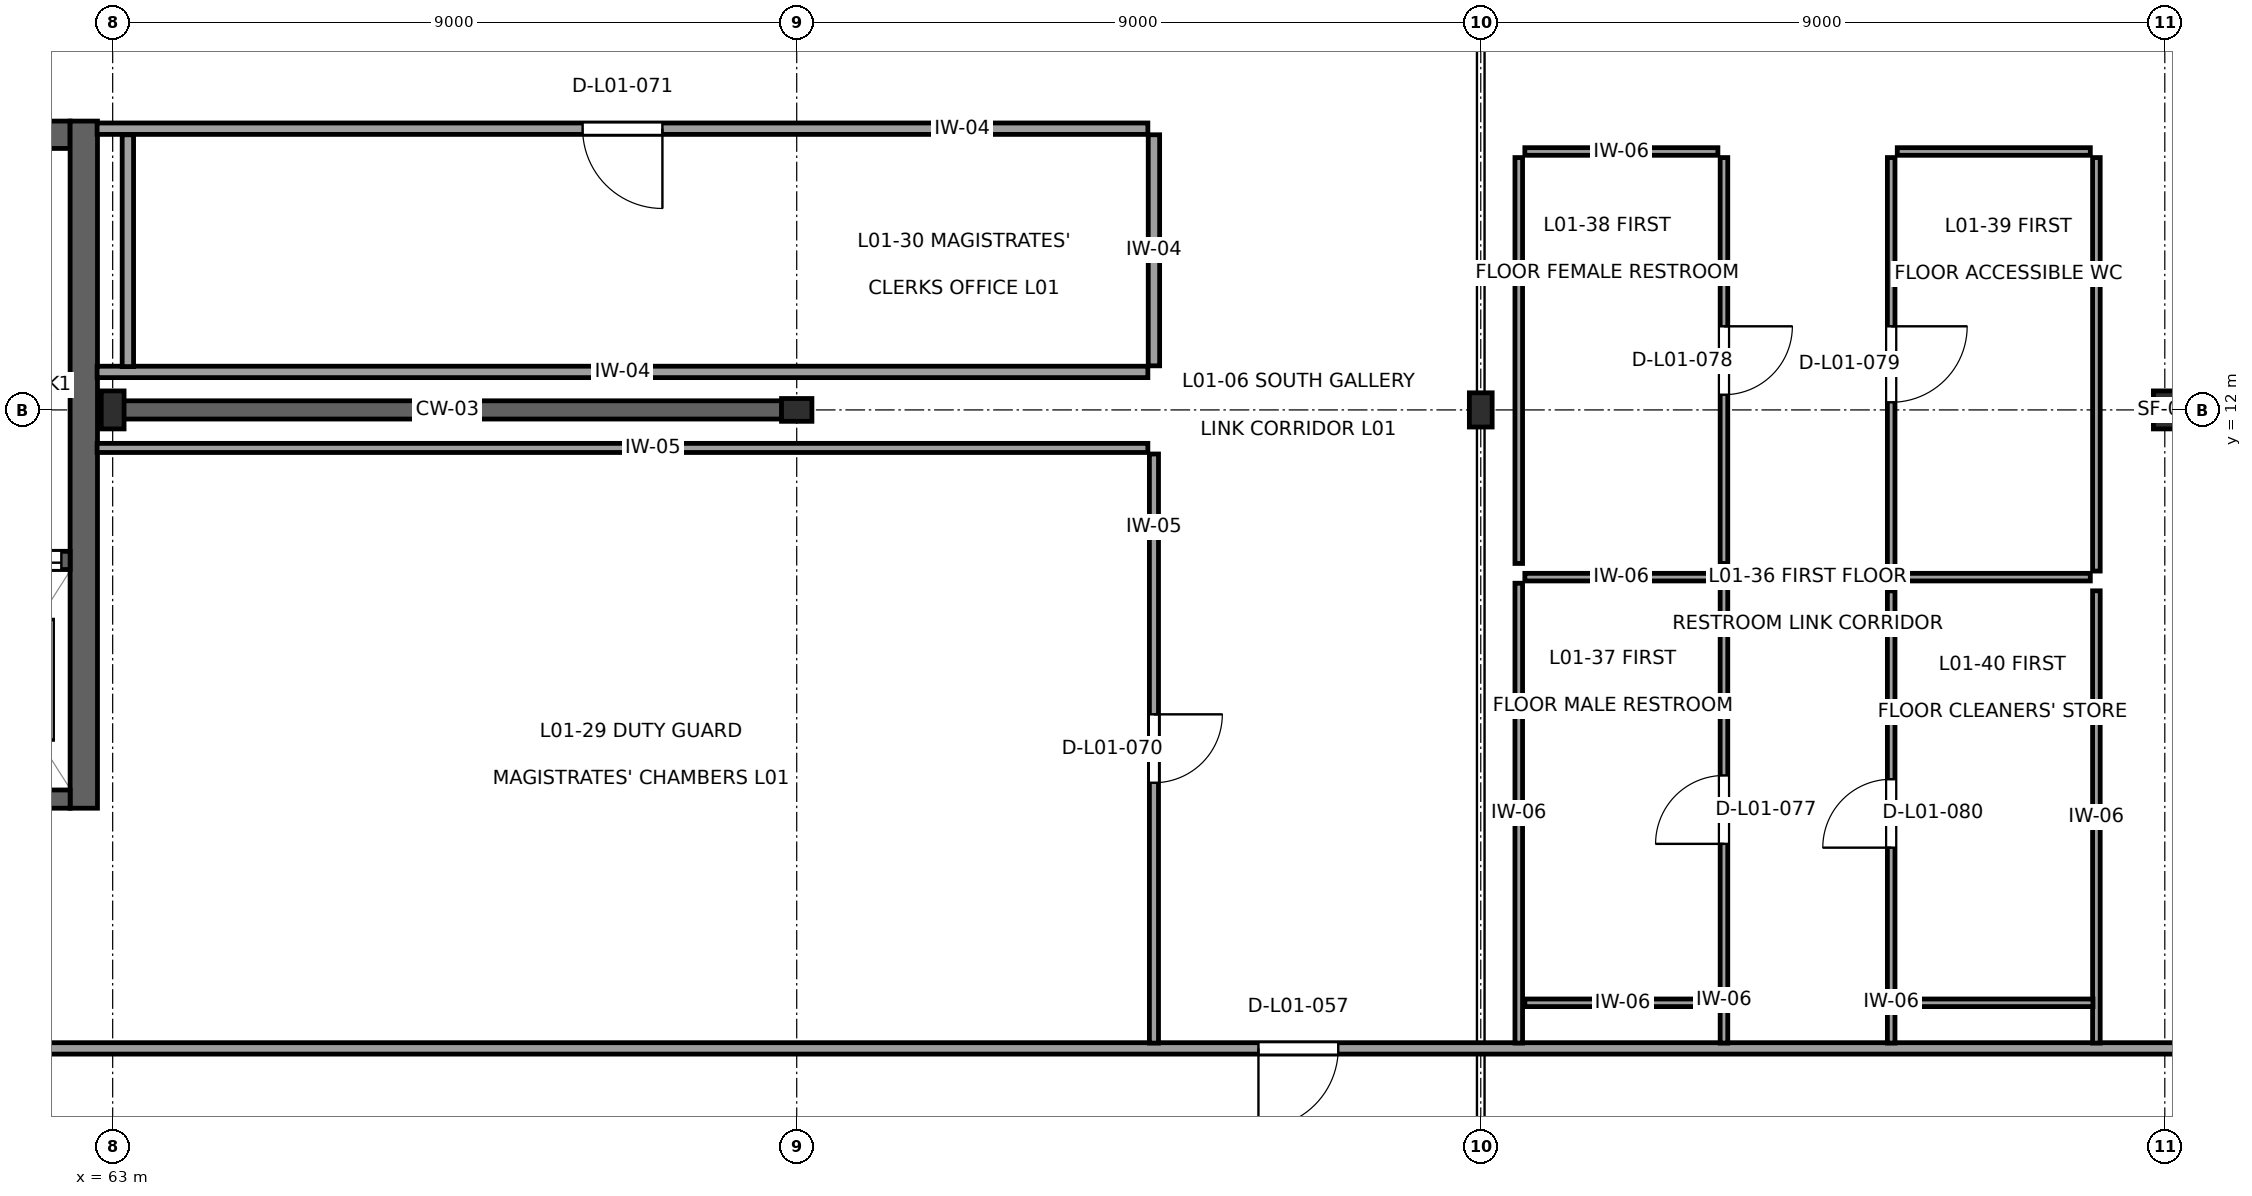
"""IFC4 building model, lengths in metres.
Left out: names, types, materials, properties, quantities, classifications, styles, units other than length and angle.
Written with IfcOpenShell. Run it as: python <this file> out.ifc"""

import sys

from ifc_helpers import new_model, si_unit, direction, frame, frame_2d, origin, origin_2d, place, context, subcontext, project, spatial, rectangle, i_section, extrude, element, fill, save


model = new_model("IFC4")
c1 = context("Model", 3, precision=1e-05, world=origin(), true_north=direction((0.0, 1.0)))
c2 = subcontext(c1, "Body", "Model", "MODEL_VIEW")
j1 = project(units=[si_unit("LENGTHUNIT", "METRE"), si_unit("PLANEANGLEUNIT", "RADIAN")], contexts=[c1])
p1 = place(None, origin())
s1 = spatial("IfcSite", under=j1, at=p1, CompositionType="ELEMENT")
p2 = place(p1, origin())
s2 = spatial("IfcBuilding", under=s1, at=p2, CompositionType="ELEMENT")
p3 = place(p2, frame((0.0, 0.0, 5.4)))
s3 = spatial("IfcBuildingStorey", under=s2, at=p3, CompositionType="ELEMENT", Elevation=5.4)
p4 = place(p3, frame((63.0, 12.0, 0.0), z_axis=(0.0, 0.0, 1.0), x_axis=(1.0, 0.0, 0.0)))
e1 = element("IfcColumn", 1, at=p4, inside=s3, PredefinedType="COLUMN", context=c2, shape_type="SweptSolid", body=[
    extrude(i_section(OverallWidth=0.3, OverallDepth=0.5, WebThickness=0.014, FlangeThickness=0.028, at=origin_2d()), origin(), (0.0, 0.0, 1.0), 4.5),
])
p5 = place(p3, frame((72.0, 12.0, 0.0), z_axis=(0.0, 0.0, 1.0), x_axis=(0.0, 1.0, 0.0)))
e2 = element("IfcColumn", 2, at=p5, inside=s3, PredefinedType="COLUMN", context=c2, shape_type="SweptSolid", body=[
    extrude(i_section(OverallWidth=0.3, OverallDepth=0.4, WebThickness=0.013, FlangeThickness=0.024, at=origin_2d()), origin(), (0.0, 0.0, 1.0), 4.5),
])
p6 = place(p3, frame((81.0, 12.0, 0.0), z_axis=(0.0, 0.0, 1.0), x_axis=(1.0, 0.0, 0.0)))
e3 = element("IfcColumn", 3, at=p6, inside=s3, PredefinedType="COLUMN", context=c2, shape_type="SweptSolid", body=[
    extrude(i_section(OverallWidth=0.3, OverallDepth=0.45, WebThickness=0.014, FlangeThickness=0.026, at=origin_2d()), origin(), (0.0, 0.0, 1.0), 4.5),
])
p7 = place(p3, frame((90.0, 12.0, 0.0), z_axis=(0.0, 0.0, 1.0), x_axis=(1.0, 0.0, 0.0)))
e4 = element("IfcColumn", 4, at=p7, inside=s3, PredefinedType="COLUMN", context=c2, shape_type="SweptSolid", body=[
    extrude(i_section(OverallWidth=0.3, OverallDepth=0.5, WebThickness=0.014, FlangeThickness=0.028, at=origin_2d()), origin(), (0.0, 0.0, 1.0), 4.5),
])
p8 = place(p3, frame((58.54, 15.62, 0.0), z_axis=(0.0, 0.0, 1.0), x_axis=(1.0, 0.0, 0.0)))
e5 = element("IfcWall", 5, at=p8, inside=s3, PredefinedType="SHEAR", context=c2, shape_type="SweptSolid", body=[
    extrude(rectangle(XDim=3.9, YDim=0.36, at=frame_2d((1.95, 0.0))), origin(), (0.0, 0.0, 1.0), 4.16),
])
p9 = place(p8, frame((1.15, 0.0, 0.0)))
e6 = element("IfcOpeningElement", 6, at=p9, cuts=e5, PredefinedType="OPENING", context=c2, shape_type="SweptSolid", body=[
    extrude(rectangle(XDim=1.6, YDim=2.25, at=frame_2d((0.8, 1.125))), frame((0.0, 0.195, 0.0), z_axis=(0.0, -1.0, 0.0), x_axis=(1.0, 0.0, 0.0)), (0.0, 0.0, 1.0), 0.39),
])
p10 = place(p3, frame((62.62, 6.76, 0.0), z_axis=(0.0, 0.0, 1.0), x_axis=(0.0, 1.0, 0.0)))
e7 = element("IfcWall", 7, at=p10, inside=s3, PredefinedType="SHEAR", context=c2, shape_type="SweptSolid", body=[
    extrude(rectangle(XDim=9.04, YDim=0.36, at=frame_2d((4.52, 0.0))), origin(), (0.0, 0.0, 1.0), 4.16),
])
p11 = place(p3, frame((58.54, 10.02, 0.0), z_axis=(0.0, 0.0, 1.0), x_axis=(1.0, 0.0, 0.0)))
e8 = element("IfcWall", 8, at=p11, inside=s3, PredefinedType="SHEAR", context=c2, shape_type="SweptSolid", body=[
    extrude(rectangle(XDim=3.9, YDim=0.24, at=frame_2d((1.95, 0.0))), origin(), (0.0, 0.0, 1.0), 4.31),
])
p12 = place(p11, frame((0.235, 0.0, 0.0)))
e9 = element("IfcOpeningElement", 9, at=p12, cuts=e8, PredefinedType="OPENING", context=c2, shape_type="SweptSolid", body=[
    extrude(rectangle(XDim=1.6, YDim=2.3, at=frame_2d((0.8, 1.15))), frame((0.0, 0.135, 0.0), z_axis=(0.0, -1.0, 0.0), x_axis=(1.0, 0.0, 0.0)), (0.0, 0.0, 1.0), 0.27),
])
p13 = place(p11, frame((2.185, 0.0, 0.0)))
e10 = element("IfcOpeningElement", 10, at=p13, cuts=e8, PredefinedType="OPENING", context=c2, shape_type="SweptSolid", body=[
    extrude(rectangle(XDim=1.6, YDim=2.3, at=frame_2d((0.8, 1.15))), frame((0.0, 0.135, 0.0), z_axis=(0.0, -1.0, 0.0), x_axis=(1.0, 0.0, 0.0)), (0.0, 0.0, 1.0), 0.27),
])
p14 = place(p3, frame((58.54, 6.88, 0.0), z_axis=(0.0, 0.0, 1.0), x_axis=(1.0, 0.0, 0.0)))
e11 = element("IfcWall", 11, at=p14, inside=s3, PredefinedType="SHEAR", context=c2, shape_type="SweptSolid", body=[
    extrude(rectangle(XDim=3.9, YDim=0.24, at=frame_2d((1.95, 0.0))), origin(), (0.0, 0.0, 1.0), 4.31),
])
p15 = place(p3, frame((63.008, 12.0, 0.0), z_axis=(0.0, 0.0, 1.0), x_axis=(1.0, 0.0, 0.0)))
e12 = element("IfcWall", 12, at=p15, inside=s3, PredefinedType="SHEAR", context=c2, shape_type="SweptSolid", body=[
    extrude(rectangle(XDim=8.794, YDim=0.24, at=frame_2d((4.397, 0.0))), origin(), (0.0, 0.0, 1.0), 3.585),
])
p16 = place(p3, frame((46.08, 3.6, 0.0), z_axis=(0.0, 0.0, 1.0), x_axis=(1.0, 0.0, 0.0)))
e13 = element("IfcWall", 13, at=p16, inside=s3, PredefinedType="PARTITIONING", context=c2, shape_type="SweptSolid", body=[
    extrude(rectangle(XDim=71.04, YDim=0.15, at=frame_2d((35.52, 0.0))), origin(), (0.0, 0.0, 1.0), 4.14),
])
p17 = place(p16, frame((31.995, 0.0, 0.0)))
e14 = element("IfcOpeningElement", 14, at=p17, cuts=e13, PredefinedType="OPENING", context=c2, shape_type="SweptSolid", body=[
    extrude(rectangle(XDim=1.05, YDim=2.25, at=frame_2d((0.525, 1.125))), frame((0.0, 0.09, 0.0), z_axis=(0.0, -1.0, 0.0), x_axis=(1.0, 0.0, 0.0)), (0.0, 0.0, 1.0), 0.18),
])
p18 = place(p16, frame((68.39, 0.0, 1.05)))
e15 = element("IfcOpeningElement", 15, at=p18, cuts=e13, PredefinedType="OPENING", context=c2, shape_type="SweptSolid", body=[
    extrude(rectangle(XDim=1.8, YDim=1.1, at=frame_2d((0.9, 0.55))), frame((0.0, 0.09, 0.0), z_axis=(0.0, -1.0, 0.0), x_axis=(1.0, 0.0, 0.0)), (0.0, 0.0, 1.0), 0.18),
])
p19 = place(p3, frame((76.7, 11.42, 0.0), z_axis=(0.0, 0.0, 1.0), x_axis=(0.0, -1.0, 0.0)))
e16 = element("IfcWall", 16, at=p19, inside=s3, PredefinedType="PARTITIONING", context=c2, shape_type="SweptSolid", body=[
    extrude(rectangle(XDim=7.75, YDim=0.12, at=frame_2d((3.875, 0.0))), origin(), (0.0, 0.0, 1.0), 4.14),
])
p20 = place(p19, frame((3.425, 0.0, 0.0)))
e17 = element("IfcOpeningElement", 17, at=p20, cuts=e16, PredefinedType="OPENING", context=c2, shape_type="SweptSolid", body=[
    extrude(rectangle(XDim=0.9, YDim=2.1, at=frame_2d((0.45, 1.05))), frame((0.0, 0.075, 0.0), z_axis=(0.0, -1.0, 0.0), x_axis=(1.0, 0.0, 0.0)), (0.0, 0.0, 1.0), 0.15),
])
p21 = place(p3, frame((62.795, 11.5, 0.0), z_axis=(0.0, 0.0, 1.0), x_axis=(1.0, 0.0, 0.0)))
e18 = element("IfcWall", 18, at=p21, inside=s3, PredefinedType="PARTITIONING", context=c2, shape_type="SweptSolid", body=[
    extrude(rectangle(XDim=13.825, YDim=0.12, at=frame_2d((6.913, 0.0))), origin(), (0.0, 0.0, 1.0), 4.14),
])
p22 = place(p3, frame((76.7, 15.62, 0.0), z_axis=(0.0, 0.0, 1.0), x_axis=(0.0, -1.0, 0.0)))
e19 = element("IfcWall", 19, at=p22, inside=s3, PredefinedType="PARTITIONING", context=c2, shape_type="SweptSolid", body=[
    extrude(rectangle(XDim=3.04, YDim=0.15, at=frame_2d((1.52, 0.0))), origin(), (0.0, 0.0, 1.0), 4.14),
])
p23 = place(p3, frame((76.62, 12.5, 0.0), z_axis=(0.0, 0.0, 1.0), x_axis=(-1.0, 0.0, 0.0)))
e20 = element("IfcWall", 20, at=p23, inside=s3, PredefinedType="PARTITIONING", context=c2, shape_type="SweptSolid", body=[
    extrude(rectangle(XDim=13.825, YDim=0.15, at=frame_2d((6.913, 0.0))), origin(), (0.0, 0.0, 1.0), 4.14),
])
p24 = place(p3, frame((63.2, 12.57, 0.0), z_axis=(0.0, 0.0, 1.0), x_axis=(0.0, 1.0, 0.0)))
e21 = element("IfcWall", 21, at=p24, inside=s3, PredefinedType="PARTITIONING", context=c2, shape_type="SweptSolid", body=[
    extrude(rectangle(XDim=3.05, YDim=0.15, at=frame_2d((1.525, 0.0))), origin(), (0.0, 0.0, 1.0), 3.685),
])
p25 = place(p3, frame((62.795, 15.7, 0.0), z_axis=(0.0, 0.0, 1.0), x_axis=(1.0, 0.0, 0.0)))
e22 = element("IfcWall", 22, at=p25, inside=s3, PredefinedType="PARTITIONING", context=c2, shape_type="SweptSolid", body=[
    extrude(rectangle(XDim=13.825, YDim=0.15, at=frame_2d((6.913, 0.0))), origin(), (0.0, 0.0, 1.0), 4.14),
])
p26 = place(p25, frame((6.388, 0.0, 0.0)))
e23 = element("IfcOpeningElement", 23, at=p26, cuts=e22, PredefinedType="OPENING", context=c2, shape_type="SweptSolid", body=[
    extrude(rectangle(XDim=1.05, YDim=2.25, at=frame_2d((0.525, 1.125))), frame((0.0, 0.09, 0.0), z_axis=(0.0, -1.0, 0.0), x_axis=(1.0, 0.0, 0.0)), (0.0, 0.0, 1.0), 0.18),
])
p27 = place(p3, frame((84.2, 9.72, 0.0), z_axis=(0.0, 0.0, 1.0), x_axis=(0.0, -1.0, 0.0)))
e24 = element("IfcWall", 24, at=p27, inside=s3, PredefinedType="PARTITIONING", context=c2, shape_type="SweptSolid", body=[
    extrude(rectangle(XDim=6.05, YDim=0.1, at=frame_2d((3.025, 0.0))), origin(), (0.0, 0.0, 1.0), 4.14),
])
p28 = place(p27, frame((2.529, 0.0, 0.0)))
e25 = element("IfcOpeningElement", 25, at=p28, cuts=e24, PredefinedType="OPENING", context=c2, shape_type="SweptSolid", body=[
    extrude(rectangle(XDim=0.9, YDim=2.05, at=frame_2d((0.45, 1.025))), frame((0.0, 0.065, 0.0), z_axis=(0.0, -1.0, 0.0), x_axis=(1.0, 0.0, 0.0)), (0.0, 0.0, 1.0), 0.13),
])
p29 = place(p3, frame((84.155, 4.2, 0.0), z_axis=(0.0, 0.0, 1.0), x_axis=(-1.0, 0.0, 0.0)))
e26 = element("IfcWall", 26, at=p29, inside=s3, PredefinedType="PARTITIONING", context=c2, shape_type="SweptSolid", body=[
    extrude(rectangle(XDim=2.575, YDim=0.1, at=frame_2d((1.288, 0.0))), origin(), (0.0, 0.0, 1.0), 4.14),
])
p30 = place(p3, frame((81.5, 3.67, 0.0), z_axis=(0.0, 0.0, 1.0), x_axis=(0.0, 1.0, 0.0)))
e27 = element("IfcWall", 27, at=p30, inside=s3, PredefinedType="PARTITIONING", context=c2, shape_type="SweptSolid", body=[
    extrude(rectangle(XDim=6.05, YDim=0.1, at=frame_2d((3.025, 0.0))), origin(), (0.0, 0.0, 1.0), 3.695),
])
p31 = place(p3, frame((81.58, 9.8, 0.0), z_axis=(0.0, 0.0, 1.0), x_axis=(1.0, 0.0, 0.0)))
e28 = element("IfcWall", 28, at=p31, inside=s3, PredefinedType="PARTITIONING", context=c2, shape_type="SweptSolid", body=[
    extrude(rectangle(XDim=2.54, YDim=0.1, at=frame_2d((1.27, 0.0))), origin(), (0.0, 0.0, 1.0), 4.14),
])
p32 = place(p3, frame((81.5, 9.98, 0.0), z_axis=(0.0, 0.0, 1.0), x_axis=(0.0, 1.0, 0.0)))
e29 = element("IfcWall", 29, at=p32, inside=s3, PredefinedType="PARTITIONING", context=c2, shape_type="SweptSolid", body=[
    extrude(rectangle(XDim=5.34, YDim=0.1, at=frame_2d((2.67, 0.0))), origin(), (0.0, 0.0, 1.0), 3.695),
])
p33 = place(p3, frame((81.58, 15.4, 0.0), z_axis=(0.0, 0.0, 1.0), x_axis=(1.0, 0.0, 0.0)))
e30 = element("IfcWall", 30, at=p33, inside=s3, PredefinedType="PARTITIONING", context=c2, shape_type="SweptSolid", body=[
    extrude(rectangle(XDim=2.54, YDim=0.1, at=frame_2d((1.27, 0.0))), origin(), (0.0, 0.0, 1.0), 4.14),
])
p34 = place(p3, frame((84.2, 15.32, 0.0), z_axis=(0.0, 0.0, 1.0), x_axis=(0.0, -1.0, 0.0)))
e31 = element("IfcWall", 31, at=p34, inside=s3, PredefinedType="PARTITIONING", context=c2, shape_type="SweptSolid", body=[
    extrude(rectangle(XDim=5.34, YDim=0.1, at=frame_2d((2.67, 0.0))), origin(), (0.0, 0.0, 1.0), 4.14),
])
p35 = place(p34, frame((2.22, 0.0, 0.0)))
e32 = element("IfcOpeningElement", 32, at=p35, cuts=e31, PredefinedType="OPENING", context=c2, shape_type="SweptSolid", body=[
    extrude(rectangle(XDim=0.9, YDim=2.05, at=frame_2d((0.45, 1.025))), frame((0.0, 0.065, 0.0), z_axis=(0.0, -1.0, 0.0), x_axis=(1.0, 0.0, 0.0)), (0.0, 0.0, 1.0), 0.13),
])
p36 = place(p3, frame((86.4, 9.88, 0.0), z_axis=(0.0, 0.0, 1.0), x_axis=(0.0, 1.0, 0.0)))
e33 = element("IfcWall", 33, at=p36, inside=s3, PredefinedType="PARTITIONING", context=c2, shape_type="SweptSolid", body=[
    extrude(rectangle(XDim=5.44, YDim=0.1, at=frame_2d((2.72, 0.0))), origin(), (0.0, 0.0, 1.0), 4.14),
])
p37 = place(p36, frame((2.22, 0.0, 0.0)))
e34 = element("IfcOpeningElement", 34, at=p37, cuts=e33, PredefinedType="OPENING", context=c2, shape_type="SweptSolid", body=[
    extrude(rectangle(XDim=1.0, YDim=2.1, at=frame_2d((0.5, 1.05))), frame((0.0, 0.065, 0.0), z_axis=(0.0, -1.0, 0.0), x_axis=(1.0, 0.0, 0.0)), (0.0, 0.0, 1.0), 0.13),
])
p38 = place(p3, frame((86.48, 15.4, 0.0), z_axis=(0.0, 0.0, 1.0), x_axis=(1.0, 0.0, 0.0)))
e35 = element("IfcWall", 35, at=p38, inside=s3, PredefinedType="PARTITIONING", context=c2, shape_type="SweptSolid", body=[
    extrude(rectangle(XDim=2.54, YDim=0.1, at=frame_2d((1.27, 0.0))), origin(), (0.0, 0.0, 1.0), 4.14),
])
p39 = place(p3, frame((89.1, 15.32, 0.0), z_axis=(0.0, 0.0, 1.0), x_axis=(0.0, -1.0, 0.0)))
e36 = element("IfcWall", 36, at=p39, inside=s3, PredefinedType="PARTITIONING", context=c2, shape_type="SweptSolid", body=[
    extrude(rectangle(XDim=5.44, YDim=0.1, at=frame_2d((2.72, 0.0))), origin(), (0.0, 0.0, 1.0), 4.14),
])
p40 = place(p3, frame((89.02, 9.8, 0.0), z_axis=(0.0, 0.0, 1.0), x_axis=(-1.0, 0.0, 0.0)))
e37 = element("IfcWall", 37, at=p40, inside=s3, PredefinedType="PARTITIONING", context=c2, shape_type="SweptSolid", body=[
    extrude(rectangle(XDim=2.54, YDim=0.1, at=frame_2d((1.27, 0.0))), origin(), (0.0, 0.0, 1.0), 4.14),
])
p41 = place(p3, frame((89.1, 9.62, 0.0), z_axis=(0.0, 0.0, 1.0), x_axis=(0.0, -1.0, 0.0)))
e38 = element("IfcWall", 38, at=p41, inside=s3, PredefinedType="PARTITIONING", context=c2, shape_type="SweptSolid", body=[
    extrude(rectangle(XDim=5.95, YDim=0.1, at=frame_2d((2.975, 0.0))), origin(), (0.0, 0.0, 1.0), 4.14),
])
p42 = place(p3, frame((89.055, 4.2, 0.0), z_axis=(0.0, 0.0, 1.0), x_axis=(-1.0, 0.0, 0.0)))
e39 = element("IfcWall", 39, at=p42, inside=s3, PredefinedType="PARTITIONING", context=c2, shape_type="SweptSolid", body=[
    extrude(rectangle(XDim=2.575, YDim=0.1, at=frame_2d((1.288, 0.0))), origin(), (0.0, 0.0, 1.0), 4.14),
])
p43 = place(p3, frame((86.4, 3.67, 0.0), z_axis=(0.0, 0.0, 1.0), x_axis=(0.0, 1.0, 0.0)))
e40 = element("IfcWall", 40, at=p43, inside=s3, PredefinedType="PARTITIONING", context=c2, shape_type="SweptSolid", body=[
    extrude(rectangle(XDim=5.95, YDim=0.1, at=frame_2d((2.975, 0.0))), origin(), (0.0, 0.0, 1.0), 4.14),
])
p44 = place(p43, frame((2.571, 0.0, 0.0)))
e41 = element("IfcOpeningElement", 41, at=p44, cuts=e40, PredefinedType="OPENING", context=c2, shape_type="SweptSolid", body=[
    extrude(rectangle(XDim=0.9, YDim=2.05, at=frame_2d((0.45, 1.025))), frame((0.0, 0.065, 0.0), z_axis=(0.0, -1.0, 0.0), x_axis=(1.0, 0.0, 0.0)), (0.0, 0.0, 1.0), 0.13),
])
p45 = place(p13, origin())
e42 = element("IfcDoor", 42, at=p45, inside=s3, OperationType="DOUBLE_DOOR_SLIDING", PredefinedType="DOOR", context=c2, shape_type="SweptSolid", body=[
    extrude(rectangle(XDim=1.6, YDim=2.3, at=frame_2d((0.8, 1.15))), frame((0.0, 0.025, 0.0), z_axis=(0.0, -1.0, 0.0), x_axis=(1.0, 0.0, 0.0)), (0.0, 0.0, 1.0), 0.05),
])
fill(e10, e42)
p46 = place(p17, frame((1.05, 0.0, 0.0), z_axis=(0.0, 0.0, 1.0), x_axis=(-1.0, 0.0, 0.0)))
e43 = element("IfcDoor", 43, at=p46, inside=s3, OperationType="SINGLE_SWING_LEFT", PredefinedType="DOOR", context=c2, shape_type="SweptSolid", body=[
    extrude(rectangle(XDim=1.05, YDim=2.25, at=frame_2d((0.525, 1.125))), frame((0.0, 0.025, 0.0), z_axis=(0.0, -1.0, 0.0), x_axis=(1.0, 0.0, 0.0)), (0.0, 0.0, 1.0), 0.05),
])
fill(e14, e43)
p47 = place(p20, origin())
e44 = element("IfcDoor", 44, at=p47, inside=s3, OperationType="SINGLE_SWING_LEFT", PredefinedType="DOOR", context=c2, shape_type="SweptSolid", body=[
    extrude(rectangle(XDim=0.9, YDim=2.1, at=frame_2d((0.45, 1.05))), frame((0.0, 0.025, 0.0), z_axis=(0.0, -1.0, 0.0), x_axis=(1.0, 0.0, 0.0)), (0.0, 0.0, 1.0), 0.05),
])
fill(e17, e44)
p48 = place(p26, frame((1.05, 0.0, 0.0), z_axis=(0.0, 0.0, 1.0), x_axis=(-1.0, 0.0, 0.0)))
e45 = element("IfcDoor", 45, at=p48, inside=s3, OperationType="SINGLE_SWING_RIGHT", PredefinedType="DOOR", context=c2, shape_type="SweptSolid", body=[
    extrude(rectangle(XDim=1.05, YDim=2.25, at=frame_2d((0.525, 1.125))), frame((0.0, 0.025, 0.0), z_axis=(0.0, -1.0, 0.0), x_axis=(1.0, 0.0, 0.0)), (0.0, 0.0, 1.0), 0.05),
])
fill(e23, e45)
p49 = place(p28, frame((0.9, 0.0, 0.0), z_axis=(0.0, 0.0, 1.0), x_axis=(-1.0, 0.0, 0.0)))
e46 = element("IfcDoor", 46, at=p49, inside=s3, OperationType="SINGLE_SWING_RIGHT", PredefinedType="DOOR", context=c2, shape_type="SweptSolid", body=[
    extrude(rectangle(XDim=0.9, YDim=2.05, at=frame_2d((0.45, 1.025))), frame((0.0, 0.025, 0.0), z_axis=(0.0, -1.0, 0.0), x_axis=(1.0, 0.0, 0.0)), (0.0, 0.0, 1.0), 0.05),
])
fill(e25, e46)
p50 = place(p35, origin())
e47 = element("IfcDoor", 47, at=p50, inside=s3, OperationType="SINGLE_SWING_LEFT", PredefinedType="DOOR", context=c2, shape_type="SweptSolid", body=[
    extrude(rectangle(XDim=0.9, YDim=2.05, at=frame_2d((0.45, 1.025))), frame((0.0, 0.025, 0.0), z_axis=(0.0, -1.0, 0.0), x_axis=(1.0, 0.0, 0.0)), (0.0, 0.0, 1.0), 0.05),
])
fill(e32, e47)
p51 = place(p37, frame((1.0, 0.0, 0.0), z_axis=(0.0, 0.0, 1.0), x_axis=(-1.0, 0.0, 0.0)))
e48 = element("IfcDoor", 48, at=p51, inside=s3, OperationType="SINGLE_SWING_RIGHT", PredefinedType="DOOR", context=c2, shape_type="SweptSolid", body=[
    extrude(rectangle(XDim=1.0, YDim=2.1, at=frame_2d((0.5, 1.05))), frame((0.0, 0.025, 0.0), z_axis=(0.0, -1.0, 0.0), x_axis=(1.0, 0.0, 0.0)), (0.0, 0.0, 1.0), 0.05),
])
fill(e34, e48)
p52 = place(p44, origin())
e49 = element("IfcDoor", 49, at=p52, inside=s3, OperationType="SINGLE_SWING_LEFT", PredefinedType="DOOR", context=c2, shape_type="SweptSolid", body=[
    extrude(rectangle(XDim=0.9, YDim=2.05, at=frame_2d((0.45, 1.025))), frame((0.0, 0.025, 0.0), z_axis=(0.0, -1.0, 0.0), x_axis=(1.0, 0.0, 0.0)), (0.0, 0.0, 1.0), 0.05),
])
fill(e41, e49)
save(model, sys.argv[1])
